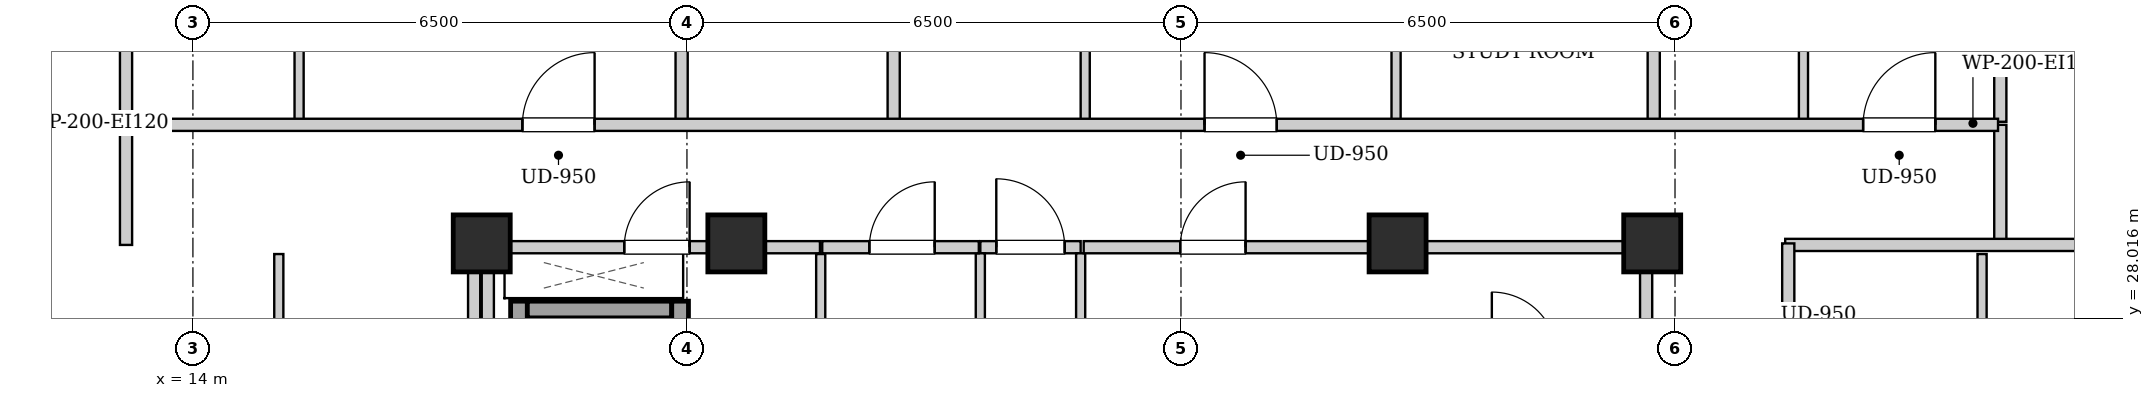
"""IFC4 building model, lengths in metres.
Left out: names, types, materials, properties, quantities, classifications, styles, units other than length and angle.
Written with IfcOpenShell. Run it as: python <this file> out.ifc"""

import sys

from ifc_helpers import new_model, si_unit, direction, frame, frame_2d, origin, origin_2d, place, context, subcontext, project, spatial, rectangle, extrude, element, fill, save


model = new_model("IFC4")
c1 = context("Model", 3, precision=1e-05, world=origin(), true_north=direction((0.0, 1.0)))
c2 = subcontext(c1, "Body", "Model", "MODEL_VIEW")
j1 = project(units=[si_unit("LENGTHUNIT", "METRE"), si_unit("PLANEANGLEUNIT", "RADIAN")], contexts=[c1])
p1 = place(None, origin())
s1 = spatial("IfcSite", under=j1, at=p1, CompositionType="ELEMENT")
p2 = place(p1, origin())
s2 = spatial("IfcBuilding", under=s1, at=p2, CompositionType="ELEMENT")
p3 = place(p2, frame((0.0, 0.0, 220.7)))
s3 = spatial("IfcBuildingStorey", under=s2, at=p3, CompositionType="ELEMENT", Elevation=220.7)
for number, where, z_axis, x_axis in (
    (1, (17.8, 29.0, 0.0), (0.0, 0.0, 1.0), (1.0, 0.0, 0.0)),
    (2, (21.15, 29.0, 0.0), (0.0, 0.0, 1.0), (1.0, 0.0, 0.0)),
    (3, (29.85, 29.0, 0.0), (0.0, 0.0, 1.0), (1.0, 0.0, 0.0)),
    (4, (33.2, 29.0, 0.0), (0.0, 0.0, 1.0), (1.0, 0.0, 0.0)),
):
    element("IfcColumn", number, at=place(p3, frame(where, z_axis=z_axis, x_axis=x_axis)), inside=s3, PredefinedType="COLUMN", context=c2, shape_type="SweptSolid", body=[
        extrude(rectangle(XDim=0.75, YDim=0.75, at=origin_2d()), origin(), (0.0, 0.0, 1.0), 3.4),
    ])
p4 = place(p3, frame((18.29, 24.1, 0.0), z_axis=(0.0, 0.0, 1.0), x_axis=(0.0, 1.0, 0.0)))
e5 = element("IfcWall", 5, at=p4, inside=s3, PredefinedType="SHEAR", context=c2, shape_type="SweptSolid", body=[
    extrude(rectangle(XDim=4.14, YDim=0.22, at=frame_2d((2.07, 0.0))), origin(), (0.0, 0.0, 1.0), 3.14),
])
p5 = place(p3, frame((18.4, 28.13, 0.0), z_axis=(0.0, 0.0, 1.0), x_axis=(1.0, 0.0, 0.0)))
e6 = element("IfcWall", 6, at=p5, inside=s3, PredefinedType="SHEAR", context=c2, shape_type="SweptSolid", body=[
    extrude(rectangle(XDim=1.9, YDim=0.22, at=frame_2d((0.95, 0.0))), origin(), (0.0, 0.0, 1.0), 3.14),
])
p6 = place(p3, frame((20.41, 26.06, 0.0), z_axis=(0.0, 0.0, 1.0), x_axis=(0.0, 1.0, 0.0)))
e7 = element("IfcWall", 7, at=p6, inside=s3, PredefinedType="SHEAR", context=c2, shape_type="SweptSolid", body=[
    extrude(rectangle(XDim=2.18, YDim=0.22, at=frame_2d((1.09, 0.0))), origin(), (0.0, 0.0, 1.0), 3.14),
])
p7 = place(p6, frame((0.54, 0.0, 0.0)))
e8 = element("IfcOpeningElement", 8, at=p7, cuts=e7, PredefinedType="OPENING", context=c2, shape_type="SweptSolid", body=[
    extrude(rectangle(XDim=1.1, YDim=2.15, at=frame_2d((0.55, 1.075))), frame((0.0, 0.12, 0.0), z_axis=(0.0, -1.0, 0.0), x_axis=(1.0, 0.0, 0.0)), (0.0, 0.0, 1.0), 0.24),
])
for number, where, z_axis, x_axis in (
    (9, (17.88, 24.12, 0.0), (0.0, 0.0, 1.0), (0.0, 1.0, 0.0)),
    (10, (33.12, 24.12, 0.0), (0.0, 0.0, 1.0), (0.0, 1.0, 0.0)),
):
    element("IfcWall", number, at=place(p3, frame(where, z_axis=z_axis, x_axis=x_axis)), inside=s3, PredefinedType="PARTITIONING", context=c2, shape_type="SweptSolid", body=[
        extrude(rectangle(XDim=4.76, YDim=0.16, at=frame_2d((2.38, 0.0))), origin(), (0.0, 0.0, 1.0), 3.14),
    ])
p8 = place(p3, frame((24.36, 28.95, 0.0), z_axis=(0.0, 0.0, 1.0), x_axis=(1.0, 0.0, 0.0)))
e11 = element("IfcWall", 11, at=p8, inside=s3, PredefinedType="PARTITIONING", context=c2, shape_type="SweptSolid", body=[
    extrude(rectangle(XDim=1.32, YDim=0.16, at=frame_2d((0.66, 0.0))), origin(), (0.0, 0.0, 1.0), 2.668),
])
p9 = place(p8, frame((0.21, 0.0, 0.0)))
e12 = element("IfcOpeningElement", 12, at=p9, cuts=e11, PredefinedType="OPENING", context=c2, shape_type="SweptSolid", body=[
    extrude(rectangle(XDim=0.9, YDim=2.05, at=frame_2d((0.45, 1.025))), frame((0.0, 0.09, 0.0), z_axis=(0.0, -1.0, 0.0), x_axis=(1.0, 0.0, 0.0)), (0.0, 0.0, 1.0), 0.18),
])
p10 = place(p3, frame((17.96, 28.95, 0.0), z_axis=(0.0, 0.0, 1.0), x_axis=(1.0, 0.0, 0.0)))
e13 = element("IfcWall", 13, at=p10, inside=s3, PredefinedType="PARTITIONING", context=c2, shape_type="SweptSolid", body=[
    extrude(rectangle(XDim=4.29, YDim=0.16, at=frame_2d((2.145, 0.0))), origin(), (0.0, 0.0, 1.0), 2.668),
])
p11 = place(p10, frame((1.715, 0.0, 0.0)))
e14 = element("IfcOpeningElement", 14, at=p11, cuts=e13, PredefinedType="OPENING", context=c2, shape_type="SweptSolid", body=[
    extrude(rectangle(XDim=0.86, YDim=2.05, at=frame_2d((0.43, 1.025))), frame((0.0, 0.09, 0.0), z_axis=(0.0, -1.0, 0.0), x_axis=(1.0, 0.0, 0.0)), (0.0, 0.0, 1.0), 0.18),
])
for number, where, z_axis, x_axis in (
    (15, (24.36, 25.0, 0.0), (0.0, 0.0, 1.0), (0.0, 1.0, 0.0)),
    (16, (25.68, 25.0, 0.0), (0.0, 0.0, 1.0), (0.0, 1.0, 0.0)),
):
    element("IfcWall", number, at=place(p3, frame(where, z_axis=z_axis, x_axis=x_axis)), inside=s3, PredefinedType="PARTITIONING", context=c2, shape_type="SweptSolid", body=[
        extrude(rectangle(XDim=3.87, YDim=0.12, at=frame_2d((1.935, 0.0))), origin(), (0.0, 0.0, 1.0), 3.14),
    ])
p12 = place(p3, frame((22.26, 25.0, 0.0), z_axis=(0.0, 0.0, 1.0), x_axis=(0.0, 1.0, 0.0)))
e17 = element("IfcWall", 17, at=p12, inside=s3, PredefinedType="PARTITIONING", context=c2, shape_type="SweptSolid", body=[
    extrude(rectangle(XDim=3.86, YDim=0.12, at=frame_2d((1.93, 0.0))), origin(), (0.0, 0.0, 1.0), 3.14),
])
p13 = place(p3, frame((22.28, 28.95, 0.0), z_axis=(0.0, 0.0, 1.0), x_axis=(1.0, 0.0, 0.0)))
e18 = element("IfcWall", 18, at=p13, inside=s3, PredefinedType="PARTITIONING", context=c2, shape_type="SweptSolid", body=[
    extrude(rectangle(XDim=2.06, YDim=0.16, at=frame_2d((1.03, 0.0))), origin(), (0.0, 0.0, 1.0), 2.668),
])
p14 = place(p13, frame((0.62, 0.0, 0.0)))
e19 = element("IfcOpeningElement", 19, at=p14, cuts=e18, PredefinedType="OPENING", context=c2, shape_type="SweptSolid", body=[
    extrude(rectangle(XDim=0.86, YDim=2.05, at=frame_2d((0.43, 1.025))), frame((0.0, 0.09, 0.0), z_axis=(0.0, -1.0, 0.0), x_axis=(1.0, 0.0, 0.0)), (0.0, 0.0, 1.0), 0.18),
])
p15 = place(p3, frame((25.72, 28.95, 0.0), z_axis=(0.0, 0.0, 1.0), x_axis=(1.0, 0.0, 0.0)))
e20 = element("IfcWall", 20, at=p15, inside=s3, PredefinedType="PARTITIONING", context=c2, shape_type="SweptSolid", body=[
    extrude(rectangle(XDim=7.32, YDim=0.16, at=frame_2d((3.66, 0.0))), origin(), (0.0, 0.0, 1.0), 2.668),
])
p16 = place(p15, frame((1.27, 0.0, 0.0)))
e21 = element("IfcOpeningElement", 21, at=p16, cuts=e20, PredefinedType="OPENING", context=c2, shape_type="SweptSolid", body=[
    extrude(rectangle(XDim=0.86, YDim=2.05, at=frame_2d((0.43, 1.025))), frame((0.0, 0.09, 0.0), z_axis=(0.0, -1.0, 0.0), x_axis=(1.0, 0.0, 0.0)), (0.0, 0.0, 1.0), 0.18),
])
for number, where, z_axis, x_axis in (
    (22, (13.12, 28.98, 0.0), (0.0, 0.0, 1.0), (0.0, 1.0, 0.0)),
    (23, (37.78, 28.98, 0.0), (0.0, 0.0, 1.0), (0.0, 1.0, 0.0)),
):
    element("IfcWall", number, at=place(p3, frame(where, z_axis=z_axis, x_axis=x_axis)), inside=s3, PredefinedType="PARTITIONING", context=c2, shape_type="SweptSolid", body=[
        extrude(rectangle(XDim=1.58, YDim=0.16, at=frame_2d((0.79, 0.0))), origin(), (0.0, 0.0, 1.0), 3.14),
    ])
p17 = place(p3, frame((34.95, 28.98, 0.0), z_axis=(0.0, 0.0, 1.0), x_axis=(1.0, 0.0, 0.0)))
e24 = element("IfcWall", 24, at=p17, inside=s3, PredefinedType="PARTITIONING", context=c2, shape_type="SweptSolid", body=[
    extrude(rectangle(XDim=5.07, YDim=0.16, at=frame_2d((2.535, 0.0))), origin(), (0.0, 0.0, 1.0), 2.668),
])
p18 = place(p3, frame((13.12, 30.6, 0.0), z_axis=(0.0, 0.0, 1.0), x_axis=(0.0, 1.0, 0.0)))
e25 = element("IfcWall", 25, at=p18, inside=s3, PredefinedType="PARTITIONING", context=c2, shape_type="SweptSolid", body=[
    extrude(rectangle(XDim=2.91, YDim=0.16, at=frame_2d((1.455, 0.0))), origin(), (0.0, 0.0, 1.0), 3.14),
])
p19 = place(p3, frame((20.43, 30.6, 0.0), z_axis=(0.0, 0.0, 1.0), x_axis=(0.0, 1.0, 0.0)))
e26 = element("IfcWall", 26, at=p19, inside=s3, PredefinedType="PARTITIONING", context=c2, shape_type="SweptSolid", body=[
    extrude(rectangle(XDim=9.32, YDim=0.16, at=frame_2d((4.66, 0.0))), origin(), (0.0, 0.0, 1.0), 3.14),
])
p20 = place(p3, frame((15.397, 30.6, 0.0), z_axis=(0.0, 0.0, 1.0), x_axis=(0.0, 1.0, 0.0)))
e27 = element("IfcWall", 27, at=p20, inside=s3, PredefinedType="PARTITIONING", context=c2, shape_type="SweptSolid", body=[
    extrude(rectangle(XDim=2.85, YDim=0.12, at=frame_2d((1.425, 0.0))), origin(), (0.0, 0.0, 1.0), 3.14),
])
p21 = place(p20, frame((0.995, 0.0, 0.0)))
e28 = element("IfcOpeningElement", 28, at=p21, cuts=e27, PredefinedType="OPENING", context=c2, shape_type="SweptSolid", body=[
    extrude(rectangle(XDim=0.86, YDim=2.05, at=frame_2d((0.43, 1.025))), frame((0.0, 0.07, 0.0), z_axis=(0.0, -1.0, 0.0), x_axis=(1.0, 0.0, 0.0)), (0.0, 0.0, 1.0), 0.14),
])
p22 = place(p3, frame((23.22, 30.6, 0.0), z_axis=(0.0, 0.0, 1.0), x_axis=(0.0, 1.0, 0.0)))
e29 = element("IfcWall", 29, at=p22, inside=s3, PredefinedType="PARTITIONING", context=c2, shape_type="SweptSolid", body=[
    extrude(rectangle(XDim=9.32, YDim=0.16, at=frame_2d((4.66, 0.0))), origin(), (0.0, 0.0, 1.0), 3.14),
])
p23 = place(p3, frame((25.74, 30.6, 0.0), z_axis=(0.0, 0.0, 1.0), x_axis=(0.0, 1.0, 0.0)))
e30 = element("IfcWall", 30, at=p23, inside=s3, PredefinedType="PARTITIONING", context=c2, shape_type="SweptSolid", body=[
    extrude(rectangle(XDim=2.85, YDim=0.12, at=frame_2d((1.425, 0.0))), origin(), (0.0, 0.0, 1.0), 3.14),
])
p24 = place(p23, frame((0.995, 0.0, 0.0)))
e31 = element("IfcOpeningElement", 31, at=p24, cuts=e30, PredefinedType="OPENING", context=c2, shape_type="SweptSolid", body=[
    extrude(rectangle(XDim=0.86, YDim=2.05, at=frame_2d((0.43, 1.025))), frame((0.0, 0.07, 0.0), z_axis=(0.0, -1.0, 0.0), x_axis=(1.0, 0.0, 0.0)), (0.0, 0.0, 1.0), 0.14),
])
p25 = place(p3, frame((29.83, 30.6, 0.0), z_axis=(0.0, 0.0, 1.0), x_axis=(0.0, 1.0, 0.0)))
e32 = element("IfcWall", 32, at=p25, inside=s3, PredefinedType="PARTITIONING", context=c2, shape_type="SweptSolid", body=[
    extrude(rectangle(XDim=2.85, YDim=0.12, at=frame_2d((1.425, 0.0))), origin(), (0.0, 0.0, 1.0), 3.14),
])
p26 = place(p25, frame((0.975, 0.0, 0.0)))
e33 = element("IfcOpeningElement", 33, at=p26, cuts=e32, PredefinedType="OPENING", context=c2, shape_type="SweptSolid", body=[
    extrude(rectangle(XDim=0.9, YDim=2.05, at=frame_2d((0.45, 1.025))), frame((0.0, 0.07, 0.0), z_axis=(0.0, -1.0, 0.0), x_axis=(1.0, 0.0, 0.0)), (0.0, 0.0, 1.0), 0.14),
])
p27 = place(p3, frame((37.78, 30.6, 0.0), z_axis=(0.0, 0.0, 1.0), x_axis=(0.0, 1.0, 0.0)))
e34 = element("IfcWall", 34, at=p27, inside=s3, PredefinedType="PARTITIONING", context=c2, shape_type="SweptSolid", body=[
    extrude(rectangle(XDim=2.91, YDim=0.16, at=frame_2d((1.455, 0.0))), origin(), (0.0, 0.0, 1.0), 3.14),
])
p28 = place(p3, frame((33.22, 30.6, 0.0), z_axis=(0.0, 0.0, 1.0), x_axis=(0.0, 1.0, 0.0)))
e35 = element("IfcWall", 35, at=p28, inside=s3, PredefinedType="PARTITIONING", context=c2, shape_type="SweptSolid", body=[
    extrude(rectangle(XDim=7.34, YDim=0.16, at=frame_2d((3.67, 0.0))), origin(), (0.0, 0.0, 1.0), 2.668),
])
p29 = place(p3, frame((35.19, 30.6, 0.0), z_axis=(0.0, 0.0, 1.0), x_axis=(0.0, 1.0, 0.0)))
e36 = element("IfcWall", 36, at=p29, inside=s3, PredefinedType="PARTITIONING", context=c2, shape_type="SweptSolid", body=[
    extrude(rectangle(XDim=2.85, YDim=0.12, at=frame_2d((1.425, 0.0))), origin(), (0.0, 0.0, 1.0), 3.14),
])
p30 = place(p29, frame((0.995, 0.0, 0.0)))
e37 = element("IfcOpeningElement", 37, at=p30, cuts=e36, PredefinedType="OPENING", context=c2, shape_type="SweptSolid", body=[
    extrude(rectangle(XDim=0.86, YDim=2.05, at=frame_2d((0.43, 1.025))), frame((0.0, 0.07, 0.0), z_axis=(0.0, -1.0, 0.0), x_axis=(1.0, 0.0, 0.0)), (0.0, 0.0, 1.0), 0.14),
])
p31 = place(p3, frame((15.13, 24.552, 0.0), z_axis=(0.0, 0.0, 1.0), x_axis=(0.0, 1.0, 0.0)))
e38 = element("IfcWall", 38, at=p31, inside=s3, PredefinedType="PARTITIONING", context=c2, shape_type="SweptSolid", body=[
    extrude(rectangle(XDim=4.308, YDim=0.12, at=frame_2d((2.154, 0.0))), origin(), (0.0, 0.0, 1.0), 3.14),
])
p32 = place(p31, frame((1.704, 0.0, 0.0)))
e39 = element("IfcOpeningElement", 39, at=p32, cuts=e38, PredefinedType="OPENING", context=c2, shape_type="SweptSolid", body=[
    extrude(rectangle(XDim=0.9, YDim=2.05, at=frame_2d((0.45, 1.025))), frame((0.0, 0.07, 0.0), z_axis=(0.0, -1.0, 0.0), x_axis=(1.0, 0.0, 0.0)), (0.0, 0.0, 1.0), 0.14),
])
p33 = place(p3, frame((37.54, 25.052, 0.0), z_axis=(0.0, 0.0, 1.0), x_axis=(0.0, 1.0, 0.0)))
e40 = element("IfcWall", 40, at=p33, inside=s3, PredefinedType="PARTITIONING", context=c2, shape_type="SweptSolid", body=[
    extrude(rectangle(XDim=3.808, YDim=0.12, at=frame_2d((1.904, 0.0))), origin(), (0.0, 0.0, 1.0), 3.14),
])
p34 = place(p33, frame((1.454, 0.0, 0.0)))
e41 = element("IfcOpeningElement", 41, at=p34, cuts=e40, PredefinedType="OPENING", context=c2, shape_type="SweptSolid", body=[
    extrude(rectangle(XDim=0.9, YDim=2.05, at=frame_2d((0.45, 1.025))), frame((0.0, 0.07, 0.0), z_axis=(0.0, -1.0, 0.0), x_axis=(1.0, 0.0, 0.0)), (0.0, 0.0, 1.0), 0.14),
])
p35 = place(p3, frame((13.15, 30.56, 0.0), z_axis=(0.0, 0.0, 1.0), x_axis=(1.0, 0.0, 0.0)))
e42 = element("IfcWall", 42, at=p35, inside=s3, PredefinedType="PARTITIONING", context=c2, shape_type="SweptSolid", body=[
    extrude(rectangle(XDim=24.6, YDim=0.16, at=frame_2d((12.3, 0.0))), origin(), (0.0, 0.0, 1.0), 3.14),
])
p36 = place(p35, frame((5.185, 0.0, 0.0)))
e43 = element("IfcOpeningElement", 43, at=p36, cuts=e42, PredefinedType="OPENING", context=c2, shape_type="SweptSolid", body=[
    extrude(rectangle(XDim=0.95, YDim=2.1, at=frame_2d((0.475, 1.05))), frame((0.0, 0.09, 0.0), z_axis=(0.0, -1.0, 0.0), x_axis=(1.0, 0.0, 0.0)), (0.0, 0.0, 1.0), 0.18),
])
p37 = place(p35, frame((14.16, 0.0, 0.0)))
e44 = element("IfcOpeningElement", 44, at=p37, cuts=e42, PredefinedType="OPENING", context=c2, shape_type="SweptSolid", body=[
    extrude(rectangle(XDim=0.95, YDim=2.1, at=frame_2d((0.475, 1.05))), frame((0.0, 0.09, 0.0), z_axis=(0.0, -1.0, 0.0), x_axis=(1.0, 0.0, 0.0)), (0.0, 0.0, 1.0), 0.18),
])
p38 = place(p35, frame((22.825, 0.0, 0.0)))
e45 = element("IfcOpeningElement", 45, at=p38, cuts=e42, PredefinedType="OPENING", context=c2, shape_type="SweptSolid", body=[
    extrude(rectangle(XDim=0.95, YDim=2.1, at=frame_2d((0.475, 1.05))), frame((0.0, 0.09, 0.0), z_axis=(0.0, -1.0, 0.0), x_axis=(1.0, 0.0, 0.0)), (0.0, 0.0, 1.0), 0.18),
])
p39 = place(p3, frame((17.7, 15.02, 0.0), z_axis=(0.0, 0.0, 1.0), x_axis=(0.0, 1.0, 0.0)))
e46 = element("IfcWall", 46, at=p39, inside=s3, PredefinedType="PARTITIONING", context=c2, shape_type="SweptSolid", body=[
    extrude(rectangle(XDim=13.98, YDim=0.16, at=frame_2d((6.99, 0.0))), origin(), (0.0, 0.0, 1.0), 3.14),
])
p40 = place(p3, frame((34.99, 15.07, 0.0), z_axis=(0.0, 0.0, 1.0), x_axis=(0.0, 1.0, 0.0)))
e47 = element("IfcWall", 47, at=p40, inside=s3, PredefinedType="PARTITIONING", context=c2, shape_type="SweptSolid", body=[
    extrude(rectangle(XDim=13.93, YDim=0.16, at=frame_2d((6.965, 0.0))), origin(), (0.0, 0.0, 1.0), 3.14),
])
p41 = place(p40, frame((4.661, 0.0, 0.0)))
e48 = element("IfcOpeningElement", 48, at=p41, cuts=e47, PredefinedType="OPENING", context=c2, shape_type="SweptSolid", body=[
    extrude(rectangle(XDim=0.95, YDim=2.1, at=frame_2d((0.475, 1.05))), frame((0.0, 0.09, 0.0), z_axis=(0.0, -1.0, 0.0), x_axis=(1.0, 0.0, 0.0)), (0.0, 0.0, 1.0), 0.18),
])
p42 = place(p40, frame((11.411, 0.0, 0.0)))
e49 = element("IfcOpeningElement", 49, at=p42, cuts=e47, PredefinedType="OPENING", context=c2, shape_type="SweptSolid", body=[
    extrude(rectangle(XDim=0.95, YDim=2.1, at=frame_2d((0.475, 1.05))), frame((0.0, 0.09, 0.0), z_axis=(0.0, -1.0, 0.0), x_axis=(1.0, 0.0, 0.0)), (0.0, 0.0, 1.0), 0.18),
])
p43 = place(p9, origin())
e50 = element("IfcDoor", 50, at=p43, inside=s3, OperationType="SINGLE_SWING_LEFT", PredefinedType="DOOR", context=c2, shape_type="SweptSolid", body=[
    extrude(rectangle(XDim=0.9, YDim=2.05, at=frame_2d((0.45, 1.025))), frame((0.0, 0.025, 0.0), z_axis=(0.0, -1.0, 0.0), x_axis=(1.0, 0.0, 0.0)), (0.0, 0.0, 1.0), 0.05),
])
fill(e12, e50)
p44 = place(p11, origin())
e51 = element("IfcDoor", 51, at=p44, inside=s3, OperationType="SINGLE_SWING_RIGHT", PredefinedType="DOOR", context=c2, shape_type="SweptSolid", body=[
    extrude(rectangle(XDim=0.86, YDim=2.05, at=frame_2d((0.43, 1.025))), frame((0.0, 0.025, 0.0), z_axis=(0.0, -1.0, 0.0), x_axis=(1.0, 0.0, 0.0)), (0.0, 0.0, 1.0), 0.05),
])
fill(e14, e51)
p45 = place(p14, origin())
e52 = element("IfcDoor", 52, at=p45, inside=s3, OperationType="SINGLE_SWING_RIGHT", PredefinedType="DOOR", context=c2, shape_type="SweptSolid", body=[
    extrude(rectangle(XDim=0.86, YDim=2.05, at=frame_2d((0.43, 1.025))), frame((0.0, 0.025, 0.0), z_axis=(0.0, -1.0, 0.0), x_axis=(1.0, 0.0, 0.0)), (0.0, 0.0, 1.0), 0.05),
])
fill(e19, e52)
p46 = place(p16, origin())
e53 = element("IfcDoor", 53, at=p46, inside=s3, OperationType="SINGLE_SWING_RIGHT", PredefinedType="DOOR", context=c2, shape_type="SweptSolid", body=[
    extrude(rectangle(XDim=0.86, YDim=2.05, at=frame_2d((0.43, 1.025))), frame((0.0, 0.025, 0.0), z_axis=(0.0, -1.0, 0.0), x_axis=(1.0, 0.0, 0.0)), (0.0, 0.0, 1.0), 0.05),
])
fill(e21, e53)
p47 = place(p36, origin())
e54 = element("IfcDoor", 54, at=p47, inside=s3, OperationType="SINGLE_SWING_RIGHT", PredefinedType="DOOR", context=c2, shape_type="SweptSolid", body=[
    extrude(rectangle(XDim=0.95, YDim=2.1, at=frame_2d((0.475, 1.05))), frame((0.0, 0.025, 0.0), z_axis=(0.0, -1.0, 0.0), x_axis=(1.0, 0.0, 0.0)), (0.0, 0.0, 1.0), 0.05),
])
fill(e43, e54)
p48 = place(p37, origin())
e55 = element("IfcDoor", 55, at=p48, inside=s3, OperationType="SINGLE_SWING_LEFT", PredefinedType="DOOR", context=c2, shape_type="SweptSolid", body=[
    extrude(rectangle(XDim=0.95, YDim=2.1, at=frame_2d((0.475, 1.05))), frame((0.0, 0.025, 0.0), z_axis=(0.0, -1.0, 0.0), x_axis=(1.0, 0.0, 0.0)), (0.0, 0.0, 1.0), 0.05),
])
fill(e44, e55)
p49 = place(p38, origin())
e56 = element("IfcDoor", 56, at=p49, inside=s3, OperationType="SINGLE_SWING_RIGHT", PredefinedType="DOOR", context=c2, shape_type="SweptSolid", body=[
    extrude(rectangle(XDim=0.95, YDim=2.1, at=frame_2d((0.475, 1.05))), frame((0.0, 0.025, 0.0), z_axis=(0.0, -1.0, 0.0), x_axis=(1.0, 0.0, 0.0)), (0.0, 0.0, 1.0), 0.05),
])
fill(e45, e56)
save(model, sys.argv[1])
